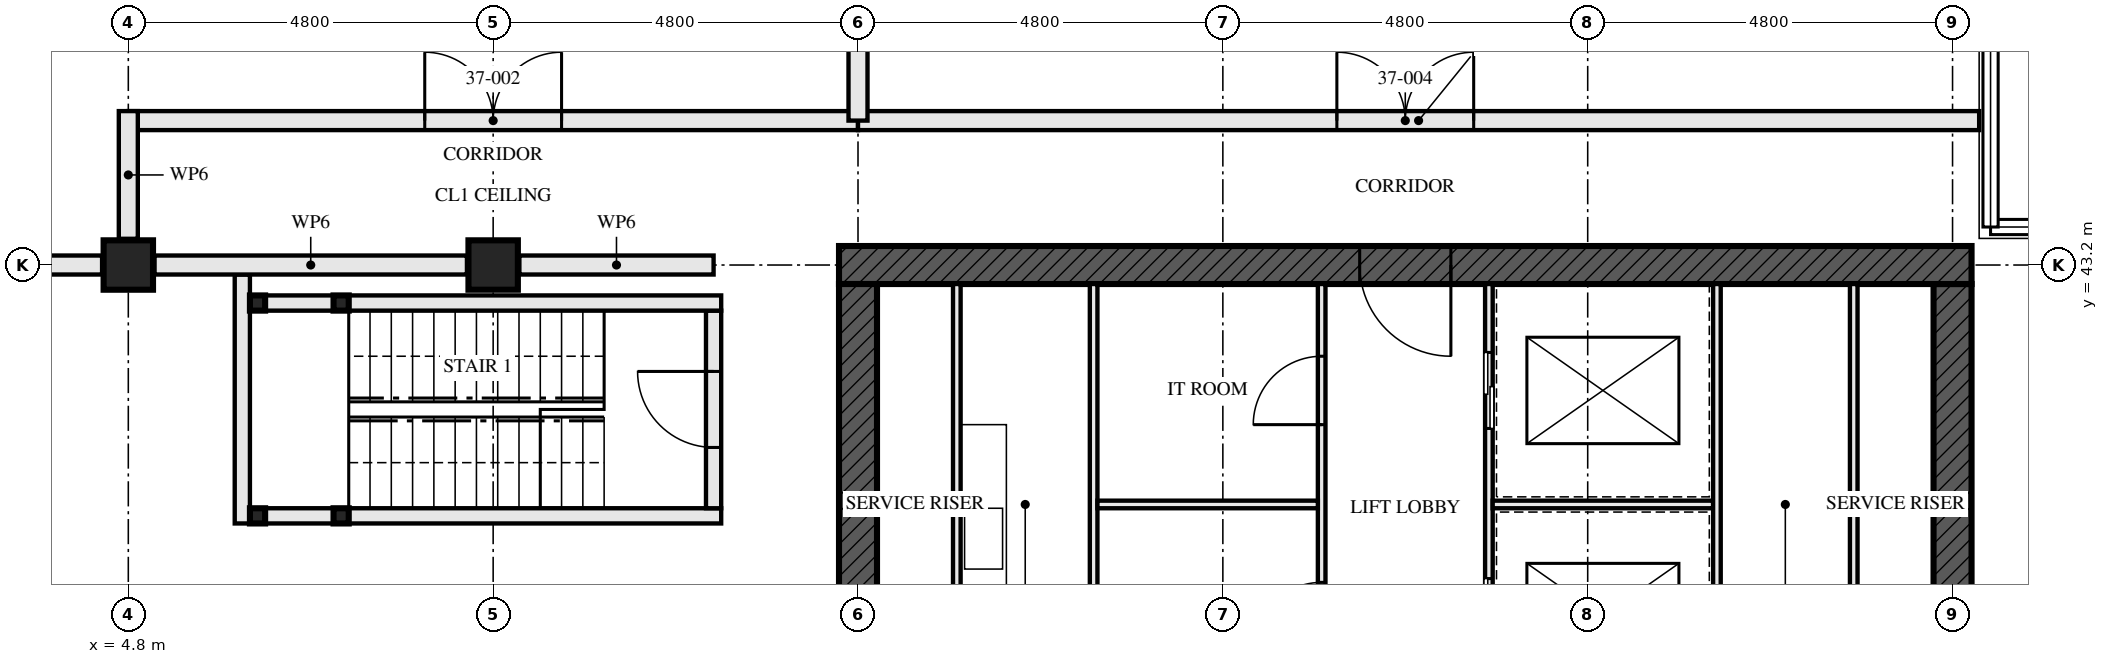
"""IFC4 building model, lengths in metres.
Left out: names, types, materials, properties, quantities, classifications, styles, units other than length and angle.
Written with IfcOpenShell. Run it as: python <this file> out.ifc"""

import sys

from ifc_helpers import new_model, si_unit, direction, frame, frame_2d, origin, origin_2d, place, context, subcontext, project, spatial, rectangle, hollow_rectangle, extrude, element, fill, save


model = new_model("IFC4")
c1 = context("Model", 3, precision=1e-05, world=origin(), true_north=direction((0.0, 1.0)))
c2 = subcontext(c1, "Body", "Model", "MODEL_VIEW")
j1 = project(units=[si_unit("LENGTHUNIT", "METRE"), si_unit("PLANEANGLEUNIT", "RADIAN")], contexts=[c1])
p1 = place(None, origin())
s1 = spatial("IfcSite", under=j1, at=p1, CompositionType="ELEMENT")
p2 = place(p1, origin())
s2 = spatial("IfcBuilding", under=s1, at=p2, CompositionType="ELEMENT")
p3 = place(p2, frame((0.0, 0.0, 136.5)))
s3 = spatial("IfcBuildingStorey", under=s2, at=p3, CompositionType="ELEMENT", Elevation=136.5)
for number, where, z_axis, x_axis in (
    (1, (4.8, 43.2, 0.0), (0.0, 0.0, 1.0), (0.0, 1.0, 0.0)),
    (2, (9.6, 43.2, 0.0), (0.0, 0.0, 1.0), (0.0, 1.0, 0.0)),
):
    element("IfcColumn", number, at=place(p3, frame(where, z_axis=z_axis, x_axis=x_axis)), inside=s3, PredefinedType="COLUMN", context=c2, shape_type="SweptSolid", body=[
        extrude(hollow_rectangle(XDim=0.65, YDim=0.65, WallThickness=0.05, at=origin_2d()), origin(), (0.0, 0.0, 1.0), 4.5),
    ])
p4 = place(p3, frame((29.05, 43.2, -0.25), z_axis=(0.0, 0.0, 1.0), x_axis=(-1.0, 0.0, 0.0)))
e3 = element("IfcWall", 3, at=p4, inside=s3, PredefinedType="SHEAR", context=c2, shape_type="SweptSolid", body=[
    extrude(rectangle(XDim=14.9, YDim=0.5, at=frame_2d((7.45, 0.0))), origin(), (0.0, 0.0, 1.0), 4.58),
])
p5 = place(p4, frame((6.85, 0.0, 0.25)))
e4 = element("IfcOpeningElement", 4, at=p5, cuts=e3, PredefinedType="OPENING", context=c2, shape_type="SweptSolid", body=[
    extrude(rectangle(XDim=1.2, YDim=2.1, at=frame_2d((0.6, 1.05))), frame((0.0, 0.26, 0.0), z_axis=(0.0, -1.0, 0.0), x_axis=(1.0, 0.0, 0.0)), (0.0, 0.0, 1.0), 0.521),
])
p6 = place(p3, frame((14.4, 42.95, -0.25), z_axis=(0.0, 0.0, 1.0), x_axis=(0.0, -1.0, 0.0)))
e5 = element("IfcWall", 5, at=p6, inside=s3, PredefinedType="SHEAR", context=c2, shape_type="SweptSolid", body=[
    extrude(rectangle(XDim=13.9, YDim=0.5, at=frame_2d((6.95, 0.0))), origin(), (0.0, 0.0, 1.0), 4.58),
])
p7 = place(p6, frame((6.35, 0.0, 0.25)))
e6 = element("IfcOpeningElement", 6, at=p7, cuts=e5, PredefinedType="OPENING", context=c2, shape_type="SweptSolid", body=[
    extrude(rectangle(XDim=1.2, YDim=2.1, at=frame_2d((0.6, 1.05))), frame((0.0, 0.26, 0.0), z_axis=(0.0, -1.0, 0.0), x_axis=(1.0, 0.0, 0.0)), (0.0, 0.0, 1.0), 0.521),
])
p8 = place(p3, frame((28.8, 29.05, -0.25), z_axis=(0.0, 0.0, 1.0), x_axis=(0.0, 1.0, 0.0)))
e7 = element("IfcWall", 7, at=p8, inside=s3, PredefinedType="SHEAR", context=c2, shape_type="SweptSolid", body=[
    extrude(rectangle(XDim=13.9, YDim=0.5, at=frame_2d((6.95, 0.0))), origin(), (0.0, 0.0, 1.0), 4.58),
])
p9 = place(p8, frame((6.35, 0.0, 0.25)))
e8 = element("IfcOpeningElement", 8, at=p9, cuts=e7, PredefinedType="OPENING", context=c2, shape_type="SweptSolid", body=[
    extrude(rectangle(XDim=1.2, YDim=2.1, at=frame_2d((0.6, 1.05))), frame((0.0, 0.26, 0.0), z_axis=(0.0, -1.0, 0.0), x_axis=(1.0, 0.0, 0.0)), (0.0, 0.0, 1.0), 0.521),
])
for number, where, z_axis, x_axis in (
    (9, (6.5, 42.7, 0.0), (0.0, 0.0, 1.0), (1.0, 0.0, 0.0)),
    (10, (6.5, 39.9, 0.0), (0.0, 0.0, 1.0), (1.0, 0.0, 0.0)),
    (11, (7.6, 42.7, 0.0), (0.0, 0.0, 1.0), (1.0, 0.0, 0.0)),
    (12, (7.6, 39.9, 0.0), (0.0, 0.0, 1.0), (1.0, 0.0, 0.0)),
):
    element("IfcColumn", number, at=place(p3, frame(where, z_axis=z_axis, x_axis=x_axis)), inside=s3, PredefinedType="COLUMN", context=c2, shape_type="SweptSolid", body=[
        extrude(hollow_rectangle(XDim=0.2, YDim=0.2, WallThickness=0.008, at=origin_2d()), origin(), (0.0, 0.0, 1.0), 4.33),
    ])
p10 = place(p3, frame((6.6, 42.7, 0.0), z_axis=(0.0, 0.0, 1.0), x_axis=(1.0, 0.0, 0.0)))
e13 = element("IfcWall", 13, at=p10, inside=s3, PredefinedType="SOLIDWALL", context=c2, shape_type="SweptSolid", body=[
    extrude(rectangle(XDim=0.9, YDim=0.2, at=frame_2d((0.45, 0.0))), origin(), (0.0, 0.0, 1.0), 3.99),
])
p11 = place(p3, frame((7.7, 42.7, 0.0), z_axis=(0.0, 0.0, 1.0), x_axis=(1.0, 0.0, 0.0)))
e14 = element("IfcWall", 14, at=p11, inside=s3, PredefinedType="SOLIDWALL", context=c2, shape_type="SweptSolid", body=[
    extrude(rectangle(XDim=4.9, YDim=0.2, at=frame_2d((2.45, 0.0))), origin(), (0.0, 0.0, 1.0), 3.99),
])
p12 = place(p3, frame((6.6, 39.9, 0.0), z_axis=(0.0, 0.0, 1.0), x_axis=(1.0, 0.0, 0.0)))
e15 = element("IfcWall", 15, at=p12, inside=s3, PredefinedType="SOLIDWALL", context=c2, shape_type="SweptSolid", body=[
    extrude(rectangle(XDim=0.9, YDim=0.2, at=frame_2d((0.45, 0.0))), origin(), (0.0, 0.0, 1.0), 3.99),
])
p13 = place(p3, frame((7.7, 39.9, 0.0), z_axis=(0.0, 0.0, 1.0), x_axis=(1.0, 0.0, 0.0)))
e16 = element("IfcWall", 16, at=p13, inside=s3, PredefinedType="SOLIDWALL", context=c2, shape_type="SweptSolid", body=[
    extrude(rectangle(XDim=4.9, YDim=0.2, at=frame_2d((2.45, 0.0))), origin(), (0.0, 0.0, 1.0), 3.99),
])
p14 = place(p3, frame((6.3, 43.075, 0.0), z_axis=(0.0, 0.0, 1.0), x_axis=(0.0, -1.0, 0.0)))
e17 = element("IfcWall", 17, at=p14, inside=s3, PredefinedType="SOLIDWALL", context=c2, shape_type="SweptSolid", body=[
    extrude(rectangle(XDim=3.275, YDim=0.2, at=frame_2d((1.637, 0.0))), origin(), (0.0, 0.0, 1.0), 4.33),
])
p15 = place(p3, frame((12.5, 42.6, 0.0), z_axis=(0.0, 0.0, 1.0), x_axis=(0.0, -1.0, 0.0)))
e18 = element("IfcWall", 18, at=p15, inside=s3, PredefinedType="SOLIDWALL", context=c2, shape_type="SweptSolid", body=[
    extrude(rectangle(XDim=2.6, YDim=0.2, at=frame_2d((1.3, 0.0))), origin(), (0.0, 0.0, 1.0), 4.33),
])
p16 = place(p15, frame((0.8, 0.0, 0.0)))
e19 = element("IfcOpeningElement", 19, at=p16, cuts=e18, PredefinedType="OPENING", context=c2, shape_type="SweptSolid", body=[
    extrude(rectangle(XDim=1.0, YDim=2.1, at=frame_2d((0.5, 1.05))), frame((0.0, 0.111, 0.0), z_axis=(0.0, -1.0, 0.0), x_axis=(1.0, 0.0, 0.0)), (0.0, 0.0, 1.0), 0.221),
])
p17 = place(p3, frame((14.4, 45.1, 0.0), z_axis=(0.0, 0.0, 1.0), x_axis=(-1.0, 0.0, 0.0)))
e20 = element("IfcWall", 20, at=p17, inside=s3, PredefinedType="SOLIDWALL", context=c2, shape_type="SweptSolid", body=[
    extrude(rectangle(XDim=9.6, YDim=0.25, at=frame_2d((4.8, 0.0))), origin(), (0.0, 0.0, 1.0), 4.33),
])
p18 = place(p17, frame((3.9, 0.0, 0.0)))
e21 = element("IfcOpeningElement", 21, at=p18, cuts=e20, PredefinedType="OPENING", context=c2, shape_type="SweptSolid", body=[
    extrude(rectangle(XDim=1.8, YDim=2.4, at=frame_2d((0.9, 1.2))), frame((0.0, 0.135, 0.0), z_axis=(0.0, -1.0, 0.0), x_axis=(1.0, 0.0, 0.0)), (0.0, 0.0, 1.0), 0.271),
])
p19 = place(p3, frame((4.8, 45.225, 0.0), z_axis=(0.0, 0.0, 1.0), x_axis=(0.0, -1.0, 0.0)))
e22 = element("IfcWall", 22, at=p19, inside=s3, PredefinedType="SOLIDWALL", context=c2, shape_type="SweptSolid", body=[
    extrude(rectangle(XDim=1.68, YDim=0.25, at=frame_2d((0.84, 0.0))), origin(), (0.0, 0.0, 1.0), 4.33),
])
p20 = place(p3, frame((29.15, 45.1, 0.0), z_axis=(0.0, 0.0, 1.0), x_axis=(-1.0, 0.0, 0.0)))
e23 = element("IfcWall", 23, at=p20, inside=s3, PredefinedType="SOLIDWALL", context=c2, shape_type="SweptSolid", body=[
    extrude(rectangle(XDim=14.75, YDim=0.25, at=frame_2d((7.375, 0.0))), origin(), (0.0, 0.0, 1.0), 3.12),
])
p21 = place(p20, frame((6.65, 0.0, 0.0)))
e24 = element("IfcOpeningElement", 24, at=p21, cuts=e23, PredefinedType="OPENING", context=c2, shape_type="SweptSolid", body=[
    extrude(rectangle(XDim=1.8, YDim=2.4, at=frame_2d((0.9, 1.2))), frame((0.0, 0.135, 0.0), z_axis=(0.0, -1.0, 0.0), x_axis=(1.0, 0.0, 0.0)), (0.0, 0.0, 1.0), 0.271),
])
for number, where, z_axis, x_axis in (
    (25, (15.7, 37.15, 0.0), (0.0, 0.0, 1.0), (0.0, 1.0, 0.0)),
    (26, (27.5, 37.15, 0.0), (0.0, 0.0, 1.0), (0.0, 1.0, 0.0)),
):
    element("IfcWall", number, at=place(p3, frame(where, z_axis=z_axis, x_axis=x_axis)), inside=s3, PredefinedType="SOLIDWALL", context=c2, shape_type="SweptSolid", body=[
        extrude(rectangle(XDim=5.8, YDim=0.1, at=frame_2d((2.9, 0.0))), origin(), (0.0, 0.0, 1.0), 4.33),
    ])
p22 = place(p3, frame((20.5, 37.15, 0.0), z_axis=(0.0, 0.0, 1.0), x_axis=(0.0, 1.0, 0.0)))
e27 = element("IfcWall", 27, at=p22, inside=s3, PredefinedType="SOLIDWALL", context=c2, shape_type="SweptSolid", body=[
    extrude(rectangle(XDim=5.8, YDim=0.1, at=frame_2d((2.9, 0.0))), origin(), (0.0, 0.0, 1.0), 4.33),
])
p23 = place(p22, frame((0.975, 0.0, 0.0)))
e28 = element("IfcOpeningElement", 28, at=p23, cuts=e27, PredefinedType="OPENING", context=c2, shape_type="SweptSolid", body=[
    extrude(rectangle(XDim=0.9, YDim=2.1, at=frame_2d((0.45, 1.05))), frame((0.0, 0.061, 0.0), z_axis=(0.0, -1.0, 0.0), x_axis=(1.0, 0.0, 0.0)), (0.0, 0.0, 1.0), 0.121),
])
p24 = place(p22, frame((3.95, 0.0, 0.0)))
e29 = element("IfcOpeningElement", 29, at=p24, cuts=e27, PredefinedType="OPENING", context=c2, shape_type="SweptSolid", body=[
    extrude(rectangle(XDim=0.9, YDim=2.1, at=frame_2d((0.45, 1.05))), frame((0.0, 0.061, 0.0), z_axis=(0.0, -1.0, 0.0), x_axis=(1.0, 0.0, 0.0)), (0.0, 0.0, 1.0), 0.121),
])
p25 = place(p3, frame((22.7, 37.15, 0.0), z_axis=(0.0, 0.0, 1.0), x_axis=(0.0, 1.0, 0.0)))
e30 = element("IfcWall", 30, at=p25, inside=s3, PredefinedType="SOLIDWALL", context=c2, shape_type="SweptSolid", body=[
    extrude(rectangle(XDim=5.8, YDim=0.1, at=frame_2d((2.9, 0.0))), origin(), (0.0, 0.0, 1.0), 4.33),
])
p26 = place(p25, frame((0.925, 0.0, 0.0)))
e31 = element("IfcOpeningElement", 31, at=p26, cuts=e30, PredefinedType="OPENING", context=c2, shape_type="SweptSolid", body=[
    extrude(rectangle(XDim=1.0, YDim=2.1, at=frame_2d((0.5, 1.05))), frame((0.0, 0.061, 0.0), z_axis=(0.0, -1.0, 0.0), x_axis=(1.0, 0.0, 0.0)), (0.0, 0.0, 1.0), 0.121),
])
p27 = place(p25, frame((3.9, 0.0, 0.0)))
e32 = element("IfcOpeningElement", 32, at=p27, cuts=e30, PredefinedType="OPENING", context=c2, shape_type="SweptSolid", body=[
    extrude(rectangle(XDim=1.0, YDim=2.1, at=frame_2d((0.5, 1.05))), frame((0.0, 0.061, 0.0), z_axis=(0.0, -1.0, 0.0), x_axis=(1.0, 0.0, 0.0)), (0.0, 0.0, 1.0), 0.121),
])
p28 = place(p3, frame((17.5, 37.15, 0.0), z_axis=(0.0, 0.0, 1.0), x_axis=(0.0, 1.0, 0.0)))
e33 = element("IfcWall", 33, at=p28, inside=s3, PredefinedType="SOLIDWALL", context=c2, shape_type="SweptSolid", body=[
    extrude(rectangle(XDim=5.8, YDim=0.1, at=frame_2d((2.9, 0.0))), origin(), (0.0, 0.0, 1.0), 4.33),
])
for number, where, z_axis, x_axis in (
    (34, (17.55, 40.05, 0.0), (0.0, 0.0, 1.0), (1.0, 0.0, 0.0)),
    (35, (22.75, 40.05, 0.0), (0.0, 0.0, 1.0), (1.0, 0.0, 0.0)),
):
    element("IfcWall", number, at=place(p3, frame(where, z_axis=z_axis, x_axis=x_axis)), inside=s3, PredefinedType="SOLIDWALL", context=c2, shape_type="SweptSolid", body=[
        extrude(rectangle(XDim=2.9, YDim=0.1, at=frame_2d((1.45, 0.0))), origin(), (0.0, 0.0, 1.0), 4.33),
    ])
p29 = place(p3, frame((25.7, 37.15, 0.0), z_axis=(0.0, 0.0, 1.0), x_axis=(0.0, 1.0, 0.0)))
e36 = element("IfcWall", 36, at=p29, inside=s3, PredefinedType="SOLIDWALL", context=c2, shape_type="SweptSolid", body=[
    extrude(rectangle(XDim=5.8, YDim=0.1, at=frame_2d((2.9, 0.0))), origin(), (0.0, 0.0, 1.0), 4.33),
])
p30 = place(p3, frame((12.5, 43.2, 0.0), z_axis=(0.0, 0.0, 1.0), x_axis=(-1.0, 0.0, 0.0)))
e37 = element("IfcWall", 37, at=p30, inside=s3, PredefinedType="SOLIDWALL", context=c2, shape_type="SweptSolid", body=[
    extrude(rectangle(XDim=2.555, YDim=0.25, at=frame_2d((1.277, 0.0))), origin(), (0.0, 0.0, 1.0), 3.12),
])
p31 = place(p3, frame((9.255, 43.2, 0.0), z_axis=(0.0, 0.0, 1.0), x_axis=(-1.0, 0.0, 0.0)))
e38 = element("IfcWall", 38, at=p31, inside=s3, PredefinedType="SOLIDWALL", context=c2, shape_type="SweptSolid", body=[
    extrude(rectangle(XDim=4.11, YDim=0.25, at=frame_2d((2.055, 0.0))), origin(), (0.0, 0.0, 1.0), 3.12),
])
p32 = place(p3, frame((4.455, 43.2, 0.0), z_axis=(0.0, 0.0, 1.0), x_axis=(-1.0, 0.0, 0.0)))
e39 = element("IfcWall", 39, at=p32, inside=s3, PredefinedType="SOLIDWALL", context=c2, shape_type="SweptSolid", body=[
    extrude(rectangle(XDim=4.11, YDim=0.25, at=frame_2d((2.055, 0.0))), origin(), (0.0, 0.0, 1.0), 3.12),
])
p33 = place(p3, frame((14.4, 45.1, 0.0), z_axis=(0.0, 0.0, 1.0), x_axis=(0.0, 1.0, 0.0)))
e40 = element("IfcWall", 40, at=p33, inside=s3, PredefinedType="SOLIDWALL", context=c2, shape_type="SweptSolid", body=[
    extrude(rectangle(XDim=2.555, YDim=0.25, at=frame_2d((1.277, 0.0))), origin(), (0.0, 0.0, 1.0), 2.82),
])
p34 = place(p16, frame((1.0, 0.0, 0.0), z_axis=(0.0, 0.0, 1.0), x_axis=(-1.0, 0.0, 0.0)))
e41 = element("IfcDoor", 41, at=p34, inside=s3, OperationType="SINGLE_SWING_LEFT", PredefinedType="DOOR", context=c2, shape_type="SweptSolid", body=[
    extrude(rectangle(XDim=1.0, YDim=2.1, at=frame_2d((0.5, 1.05))), frame((0.0, 0.032, 0.0), z_axis=(0.0, -1.0, 0.0), x_axis=(1.0, 0.0, 0.0)), (0.0, 0.0, 1.0), 0.064),
])
fill(e19, e41)
p35 = place(p18, frame((1.8, 0.0, 0.0), z_axis=(0.0, 0.0, 1.0), x_axis=(-1.0, 0.0, 0.0)))
e42 = element("IfcDoor", 42, at=p35, inside=s3, OperationType="DOUBLE_DOOR_SINGLE_SWING", PredefinedType="DOOR", context=c2, shape_type="SweptSolid", body=[
    extrude(rectangle(XDim=1.8, YDim=2.4, at=frame_2d((0.9, 1.2))), frame((0.0, 0.032, 0.0), z_axis=(0.0, -1.0, 0.0), x_axis=(1.0, 0.0, 0.0)), (0.0, 0.0, 1.0), 0.064),
])
fill(e21, e42)
p36 = place(p21, frame((1.8, 0.0, 0.0), z_axis=(0.0, 0.0, 1.0), x_axis=(-1.0, 0.0, 0.0)))
e43 = element("IfcDoor", 43, at=p36, inside=s3, OperationType="DOUBLE_DOOR_SINGLE_SWING", PredefinedType="DOOR", context=c2, shape_type="SweptSolid", body=[
    extrude(rectangle(XDim=1.8, YDim=2.4, at=frame_2d((0.9, 1.2))), frame((0.0, 0.032, 0.0), z_axis=(0.0, -1.0, 0.0), x_axis=(1.0, 0.0, 0.0)), (0.0, 0.0, 1.0), 0.064),
])
fill(e24, e43)
p37 = place(p23, origin())
e44 = element("IfcDoor", 44, at=p37, inside=s3, OperationType="SINGLE_SWING_RIGHT", PredefinedType="DOOR", context=c2, shape_type="SweptSolid", body=[
    extrude(rectangle(XDim=0.9, YDim=2.1, at=frame_2d((0.45, 1.05))), frame((0.0, 0.027, 0.0), z_axis=(0.0, -1.0, 0.0), x_axis=(1.0, 0.0, 0.0)), (0.0, 0.0, 1.0), 0.054),
])
fill(e28, e44)
p38 = place(p24, origin())
e45 = element("IfcDoor", 45, at=p38, inside=s3, OperationType="SINGLE_SWING_RIGHT", PredefinedType="DOOR", context=c2, shape_type="SweptSolid", body=[
    extrude(rectangle(XDim=0.9, YDim=2.1, at=frame_2d((0.45, 1.05))), frame((0.0, 0.027, 0.0), z_axis=(0.0, -1.0, 0.0), x_axis=(1.0, 0.0, 0.0)), (0.0, 0.0, 1.0), 0.054),
])
fill(e29, e45)
p39 = place(p26, origin())
e46 = element("IfcDoor", 46, at=p39, inside=s3, OperationType="SLIDING_TO_LEFT", PredefinedType="DOOR", context=c2, shape_type="SweptSolid", body=[
    extrude(rectangle(XDim=1.0, YDim=2.1, at=frame_2d((0.5, 1.05))), frame((0.0, 0.05, 0.0), z_axis=(0.0, -1.0, 0.0), x_axis=(1.0, 0.0, 0.0)), (0.0, 0.0, 1.0), 0.1),
])
fill(e31, e46)
p40 = place(p27, origin())
e47 = element("IfcDoor", 47, at=p40, inside=s3, OperationType="SLIDING_TO_LEFT", PredefinedType="DOOR", context=c2, shape_type="SweptSolid", body=[
    extrude(rectangle(XDim=1.0, YDim=2.1, at=frame_2d((0.5, 1.05))), frame((0.0, 0.05, 0.0), z_axis=(0.0, -1.0, 0.0), x_axis=(1.0, 0.0, 0.0)), (0.0, 0.0, 1.0), 0.1),
])
fill(e32, e47)
p41 = place(p5, origin())
e48 = element("IfcDoor", 48, at=p41, inside=s3, OperationType="SINGLE_SWING_LEFT", PredefinedType="DOOR", context=c2, shape_type="SweptSolid", body=[
    extrude(rectangle(XDim=1.2, YDim=2.1, at=frame_2d((0.6, 1.05))), frame((0.0, 0.027, 0.0), z_axis=(0.0, -1.0, 0.0), x_axis=(1.0, 0.0, 0.0)), (0.0, 0.0, 1.0), 0.054),
])
fill(e4, e48)
save(model, sys.argv[1])
